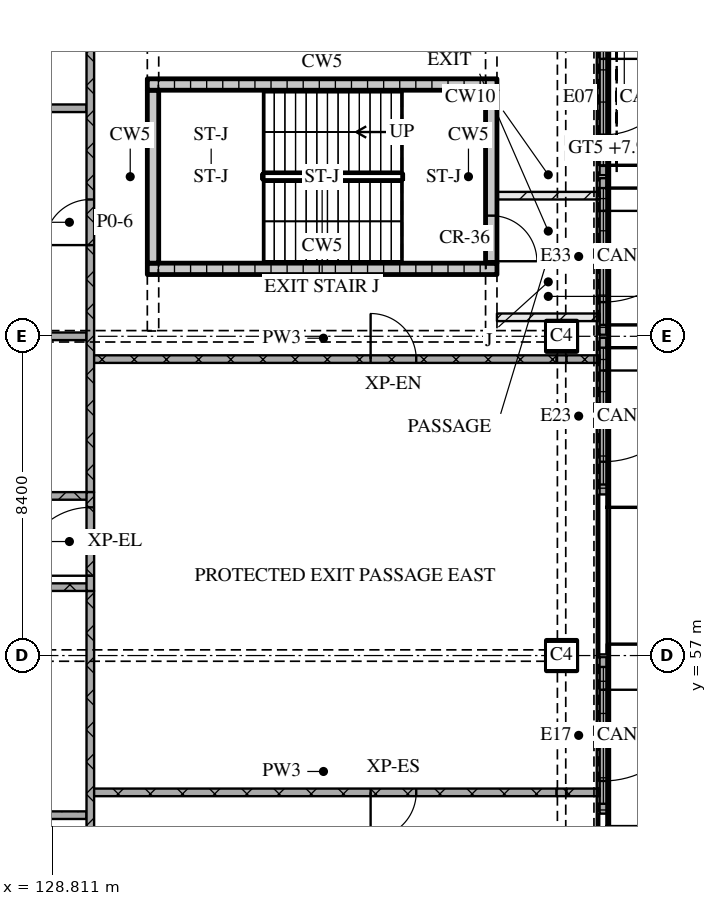
"""IFC4 building model, lengths in metres.
Left out: names, types, materials, properties, quantities, classifications, styles, units other than length and angle.
Written with IfcOpenShell. Run it as: python <this file> out.ifc"""

import sys

from ifc_helpers import new_model, si_unit, direction, frame, frame_2d, origin, origin_2d, place, context, subcontext, project, spatial, rectangle, extrude, element, fill, save


model = new_model("IFC4")
c1 = context("Model", 3, precision=1e-05, world=origin(), true_north=direction((0.0, 1.0)))
c2 = subcontext(c1, "Body", "Model", "MODEL_VIEW")
j1 = project(units=[si_unit("LENGTHUNIT", "METRE"), si_unit("PLANEANGLEUNIT", "RADIAN")], contexts=[c1])
p1 = place(None, origin())
s1 = spatial("IfcSite", under=j1, at=p1, CompositionType="ELEMENT")
p2 = place(p1, origin())
s2 = spatial("IfcBuilding", under=s1, at=p2, CompositionType="ELEMENT")
p3 = place(p2, origin())
s3 = spatial("IfcBuildingStorey", under=s2, at=p3, CompositionType="ELEMENT", Elevation=0.0)
for number, where, z_axis, x_axis in (
    (1, (142.2, 57.0, 0.0), (0.0, 0.0, 1.0), (1.0, 0.0, 0.0)),
    (2, (142.2, 65.4, 0.0), (0.0, 0.0, 1.0), (1.0, 0.0, 0.0)),
):
    element("IfcColumn", number, at=place(p3, frame(where, z_axis=z_axis, x_axis=x_axis)), inside=s3, PredefinedType="COLUMN", context=c2, shape_type="SweptSolid", body=[
        extrude(rectangle(XDim=0.8, YDim=0.8, at=origin_2d()), origin(), (0.0, 0.0, 1.0), 9.0),
    ])
p4 = place(p3, frame((143.3, 73.76, 0.0), z_axis=(0.0, 0.0, 1.0), x_axis=(0.0, -1.0, 0.0)))
e3 = element("IfcWall", 3, at=p4, inside=s3, PredefinedType="SOLIDWALL", context=c2, shape_type="SweptSolid", body=[
    extrude(rectangle(XDim=4.12, YDim=0.2, at=frame_2d((2.06, 0.0))), origin(), (0.0, 0.0, 1.0), 8.7),
])
p5 = place(p4, frame((1.06, 0.0, 0.0)))
e4 = element("IfcOpeningElement", 4, at=p5, cuts=e3, PredefinedType="OPENING", context=c2, shape_type="SweptSolid", body=[
    extrude(rectangle(XDim=2.0, YDim=2.4, at=frame_2d((1.0, 1.2))), frame((0.0, 0.11, 0.0), z_axis=(0.0, -1.0, 0.0), x_axis=(1.0, 0.0, 0.0)), (0.0, 0.0, 1.0), 0.22),
])
p6 = place(p4, frame((0.26, 0.0, 2.7)))
e5 = element("IfcOpeningElement", 5, at=p6, cuts=e3, PredefinedType="OPENING", context=c2, shape_type="SweptSolid", body=[
    extrude(rectangle(XDim=3.6, YDim=5.6, at=frame_2d((1.8, 2.8))), frame((0.0, 0.11, 0.0), z_axis=(0.0, -1.0, 0.0), x_axis=(1.0, 0.0, 0.0)), (0.0, 0.0, 1.0), 0.22),
])
p7 = place(p3, frame((143.3, 56.96, 0.0), z_axis=(0.0, 0.0, 1.0), x_axis=(0.0, -1.0, 0.0)))
e6 = element("IfcWall", 6, at=p7, inside=s3, PredefinedType="SOLIDWALL", context=c2, shape_type="SweptSolid", body=[
    extrude(rectangle(XDim=4.12, YDim=0.2, at=frame_2d((2.06, 0.0))), origin(), (0.0, 0.0, 1.0), 8.7),
])
p8 = place(p7, frame((0.86, 0.0, 0.0)))
e7 = element("IfcOpeningElement", 7, at=p8, cuts=e6, PredefinedType="OPENING", context=c2, shape_type="SweptSolid", body=[
    extrude(rectangle(XDim=2.4, YDim=2.4, at=frame_2d((1.2, 1.2))), frame((0.0, 0.11, 0.0), z_axis=(0.0, -1.0, 0.0), x_axis=(1.0, 0.0, 0.0)), (0.0, 0.0, 1.0), 0.22),
])
p9 = place(p7, frame((0.26, 0.0, 2.7)))
e8 = element("IfcOpeningElement", 8, at=p9, cuts=e6, PredefinedType="OPENING", context=c2, shape_type="SweptSolid", body=[
    extrude(rectangle(XDim=3.6, YDim=5.6, at=frame_2d((1.8, 2.8))), frame((0.0, 0.11, 0.0), z_axis=(0.0, -1.0, 0.0), x_axis=(1.0, 0.0, 0.0)), (0.0, 0.0, 1.0), 0.22),
])
p10 = place(p3, frame((143.3, 65.36, 0.0), z_axis=(0.0, 0.0, 1.0), x_axis=(0.0, -1.0, 0.0)))
e9 = element("IfcWall", 9, at=p10, inside=s3, PredefinedType="SOLIDWALL", context=c2, shape_type="SweptSolid", body=[
    extrude(rectangle(XDim=4.12, YDim=0.2, at=frame_2d((2.06, 0.0))), origin(), (0.0, 0.0, 1.0), 8.7),
])
p11 = place(p10, frame((0.86, 0.0, 0.0)))
e10 = element("IfcOpeningElement", 10, at=p11, cuts=e9, PredefinedType="OPENING", context=c2, shape_type="SweptSolid", body=[
    extrude(rectangle(XDim=2.4, YDim=2.4, at=frame_2d((1.2, 1.2))), frame((0.0, 0.11, 0.0), z_axis=(0.0, -1.0, 0.0), x_axis=(1.0, 0.0, 0.0)), (0.0, 0.0, 1.0), 0.22),
])
p12 = place(p10, frame((0.26, 0.0, 2.7)))
e11 = element("IfcOpeningElement", 11, at=p12, cuts=e9, PredefinedType="OPENING", context=c2, shape_type="SweptSolid", body=[
    extrude(rectangle(XDim=3.6, YDim=5.6, at=frame_2d((1.8, 2.8))), frame((0.0, 0.11, 0.0), z_axis=(0.0, -1.0, 0.0), x_axis=(1.0, 0.0, 0.0)), (0.0, 0.0, 1.0), 0.22),
])
p13 = place(p3, frame((143.3, 69.56, 0.0), z_axis=(0.0, 0.0, 1.0), x_axis=(0.0, -1.0, 0.0)))
e12 = element("IfcWall", 12, at=p13, inside=s3, PredefinedType="SOLIDWALL", context=c2, shape_type="SweptSolid", body=[
    extrude(rectangle(XDim=4.12, YDim=0.2, at=frame_2d((2.06, 0.0))), origin(), (0.0, 0.0, 1.0), 8.7),
])
p14 = place(p13, frame((0.86, 0.0, 0.0)))
e13 = element("IfcOpeningElement", 13, at=p14, cuts=e12, PredefinedType="OPENING", context=c2, shape_type="SweptSolid", body=[
    extrude(rectangle(XDim=2.4, YDim=2.4, at=frame_2d((1.2, 1.2))), frame((0.0, 0.11, 0.0), z_axis=(0.0, -1.0, 0.0), x_axis=(1.0, 0.0, 0.0)), (0.0, 0.0, 1.0), 0.22),
])
p15 = place(p13, frame((0.26, 0.0, 2.7)))
e14 = element("IfcOpeningElement", 14, at=p15, cuts=e12, PredefinedType="OPENING", context=c2, shape_type="SweptSolid", body=[
    extrude(rectangle(XDim=3.6, YDim=5.6, at=frame_2d((1.8, 2.8))), frame((0.0, 0.11, 0.0), z_axis=(0.0, -1.0, 0.0), x_axis=(1.0, 0.0, 0.0)), (0.0, 0.0, 1.0), 0.22),
])
p16 = place(p3, frame((131.3, 67.175, 0.0), z_axis=(0.0, 0.0, 1.0), x_axis=(1.0, 0.0, 0.0)))
e15 = element("IfcWall", 15, at=p16, inside=s3, PredefinedType="SOLIDWALL", context=c2, shape_type="SweptSolid", body=[
    extrude(rectangle(XDim=9.2, YDim=0.3, at=frame_2d((4.6, 0.0))), origin(), (0.0, 0.0, 1.0), 8.7),
])
p17 = place(p3, frame((131.45, 67.325, 0.0), z_axis=(0.0, 0.0, 1.0), x_axis=(0.0, 1.0, 0.0)))
e16 = element("IfcWall", 16, at=p17, inside=s3, PredefinedType="SOLIDWALL", context=c2, shape_type="SweptSolid", body=[
    extrude(rectangle(XDim=4.55, YDim=0.3, at=frame_2d((2.275, 0.0))), origin(), (0.0, 0.0, 1.0), 8.7),
])
p18 = place(p3, frame((140.35, 67.325, 0.0), z_axis=(0.0, 0.0, 1.0), x_axis=(0.0, 1.0, 0.0)))
e17 = element("IfcWall", 17, at=p18, inside=s3, PredefinedType="SOLIDWALL", context=c2, shape_type="SweptSolid", body=[
    extrude(rectangle(XDim=4.55, YDim=0.3, at=frame_2d((2.275, 0.0))), origin(), (0.0, 0.0, 1.0), 8.7),
])
p19 = place(p18, frame((0.05, 0.0, 0.0)))
e18 = element("IfcOpeningElement", 18, at=p19, cuts=e17, PredefinedType="OPENING", context=c2, shape_type="SweptSolid", body=[
    extrude(rectangle(XDim=1.2, YDim=2.1, at=frame_2d((0.6, 1.05))), frame((0.0, 0.16, 0.0), z_axis=(0.0, -1.0, 0.0), x_axis=(1.0, 0.0, 0.0)), (0.0, 0.0, 1.0), 0.32),
])
p20 = place(p3, frame((131.3, 72.025, 0.0), z_axis=(0.0, 0.0, 1.0), x_axis=(1.0, 0.0, 0.0)))
e19 = element("IfcWall", 19, at=p20, inside=s3, PredefinedType="SOLIDWALL", context=c2, shape_type="SweptSolid", body=[
    extrude(rectangle(XDim=9.2, YDim=0.3, at=frame_2d((4.6, 0.0))), origin(), (0.0, 0.0, 1.0), 8.7),
])
for number, where, z_axis, x_axis in (
    (20, (140.5, 65.9, 0.0), (0.0, 0.0, 1.0), (1.0, 0.0, 0.0)),
    (21, (140.5, 69.1, 0.0), (0.0, 0.0, 1.0), (1.0, 0.0, 0.0)),
):
    element("IfcWall", number, at=place(p3, frame(where, z_axis=z_axis, x_axis=x_axis)), inside=s3, PredefinedType="PARTITIONING", context=c2, shape_type="SweptSolid", body=[
        extrude(rectangle(XDim=2.7, YDim=0.2, at=frame_2d((1.35, 0.0))), origin(), (0.0, 0.0, 1.0), 8.7),
    ])
p21 = place(p3, frame((129.8, 53.4, 0.0), z_axis=(0.0, 0.0, 1.0), x_axis=(1.0, 0.0, 0.0)))
e22 = element("IfcWall", 22, at=p21, inside=s3, PredefinedType="PARTITIONING", context=c2, shape_type="SweptSolid", body=[
    extrude(rectangle(XDim=12.27, YDim=0.2, at=frame_2d((6.135, 0.0))), origin(), (0.0, 0.0, 1.0), 8.7),
])
p22 = place(p21, frame((7.375, 0.0, 0.0)))
e23 = element("IfcOpeningElement", 23, at=p22, cuts=e22, PredefinedType="OPENING", context=c2, shape_type="SweptSolid", body=[
    extrude(rectangle(XDim=1.2, YDim=2.1, at=frame_2d((0.6, 1.05))), frame((0.0, 0.11, 0.0), z_axis=(0.0, -1.0, 0.0), x_axis=(1.0, 0.0, 0.0)), (0.0, 0.0, 1.0), 0.22),
])
p23 = place(p3, frame((142.07, 53.4, 0.0), z_axis=(0.0, 0.0, 1.0), x_axis=(1.0, 0.0, 0.0)))
e24 = element("IfcWall", 24, at=p23, inside=s3, PredefinedType="PARTITIONING", context=c2, shape_type="SweptSolid", body=[
    extrude(rectangle(XDim=0.26, YDim=0.2, at=frame_2d((0.13, 0.0))), origin(), (0.0, 0.0, 1.0), 8.1),
])
p24 = place(p3, frame((142.33, 53.4, 0.0), z_axis=(0.0, 0.0, 1.0), x_axis=(1.0, 0.0, 0.0)))
e25 = element("IfcWall", 25, at=p24, inside=s3, PredefinedType="PARTITIONING", context=c2, shape_type="SweptSolid", body=[
    extrude(rectangle(XDim=0.87, YDim=0.2, at=frame_2d((0.435, 0.0))), origin(), (0.0, 0.0, 1.0), 8.7),
])
p25 = place(p3, frame((129.8, 64.8, 0.0), z_axis=(0.0, 0.0, 1.0), x_axis=(1.0, 0.0, 0.0)))
e26 = element("IfcWall", 26, at=p25, inside=s3, PredefinedType="PARTITIONING", context=c2, shape_type="SweptSolid", body=[
    extrude(rectangle(XDim=12.27, YDim=0.2, at=frame_2d((6.135, 0.0))), origin(), (0.0, 0.0, 1.0), 8.7),
])
p26 = place(p25, frame((7.375, 0.0, 0.0)))
e27 = element("IfcOpeningElement", 27, at=p26, cuts=e26, PredefinedType="OPENING", context=c2, shape_type="SweptSolid", body=[
    extrude(rectangle(XDim=1.2, YDim=2.1, at=frame_2d((0.6, 1.05))), frame((0.0, 0.11, 0.0), z_axis=(0.0, -1.0, 0.0), x_axis=(1.0, 0.0, 0.0)), (0.0, 0.0, 1.0), 0.22),
])
p27 = place(p3, frame((142.07, 64.8, 0.0), z_axis=(0.0, 0.0, 1.0), x_axis=(1.0, 0.0, 0.0)))
e28 = element("IfcWall", 28, at=p27, inside=s3, PredefinedType="PARTITIONING", context=c2, shape_type="SweptSolid", body=[
    extrude(rectangle(XDim=0.26, YDim=0.2, at=frame_2d((0.13, 0.0))), origin(), (0.0, 0.0, 1.0), 8.1),
])
p28 = place(p3, frame((142.33, 64.8, 0.0), z_axis=(0.0, 0.0, 1.0), x_axis=(1.0, 0.0, 0.0)))
e29 = element("IfcWall", 29, at=p28, inside=s3, PredefinedType="PARTITIONING", context=c2, shape_type="SweptSolid", body=[
    extrude(rectangle(XDim=0.87, YDim=0.2, at=frame_2d((0.435, 0.0))), origin(), (0.0, 0.0, 1.0), 8.7),
])
p29 = place(p3, frame((107.5, 52.8, 0.0), z_axis=(0.0, 0.0, 1.0), x_axis=(1.0, 0.0, 0.0)))
e30 = element("IfcWall", 30, at=p29, inside=s3, PredefinedType="PARTITIONING", context=c2, shape_type="SweptSolid", body=[
    extrude(rectangle(XDim=22.2, YDim=0.2, at=frame_2d((11.1, 0.0))), origin(), (0.0, 0.0, 1.0), 8.7),
])
p30 = place(p3, frame((129.8, 58.8, 0.0), z_axis=(0.0, 0.0, 1.0), x_axis=(-1.0, 0.0, 0.0)))
e31 = element("IfcWall", 31, at=p30, inside=s3, PredefinedType="PARTITIONING", context=c2, shape_type="SweptSolid", body=[
    extrude(rectangle(XDim=22.4, YDim=0.2, at=frame_2d((11.2, 0.0))), origin(), (0.0, 0.0, 1.0), 8.7),
])
p31 = place(p30, frame((10.6, 0.0, 0.0)))
e32 = element("IfcOpeningElement", 32, at=p31, cuts=e31, PredefinedType="OPENING", context=c2, shape_type="SweptSolid", body=[
    extrude(rectangle(XDim=1.2, YDim=2.1, at=frame_2d((0.6, 1.05))), frame((0.0, 0.11, 0.0), z_axis=(0.0, -1.0, 0.0), x_axis=(1.0, 0.0, 0.0)), (0.0, 0.0, 1.0), 0.22),
])
p32 = place(p3, frame((111.0, 61.2, 0.0), z_axis=(0.0, 0.0, 1.0), x_axis=(1.0, 0.0, 0.0)))
e33 = element("IfcWall", 33, at=p32, inside=s3, PredefinedType="PARTITIONING", context=c2, shape_type="SweptSolid", body=[
    extrude(rectangle(XDim=18.8, YDim=0.2, at=frame_2d((9.4, 0.0))), origin(), (0.0, 0.0, 1.0), 8.7),
])
p33 = place(p3, frame((126.52, 65.4, 0.0), z_axis=(0.0, 0.0, 1.0), x_axis=(1.0, 0.0, 0.0)))
e34 = element("IfcWall", 34, at=p33, inside=s3, PredefinedType="PARTITIONING", context=c2, shape_type="SweptSolid", body=[
    extrude(rectangle(XDim=3.18, YDim=0.2, at=frame_2d((1.59, 0.0))), origin(), (0.0, 0.0, 1.0), 7.71),
])
p34 = place(p3, frame((117.8, 71.4, 0.0), z_axis=(0.0, 0.0, 1.0), x_axis=(1.0, 0.0, 0.0)))
e35 = element("IfcWall", 35, at=p34, inside=s3, PredefinedType="PARTITIONING", context=c2, shape_type="SweptSolid", body=[
    extrude(rectangle(XDim=11.9, YDim=0.2, at=frame_2d((5.95, 0.0))), origin(), (0.0, 0.0, 1.0), 8.7),
])
p35 = place(p3, frame((129.8, 58.7, 0.0), z_axis=(0.0, 0.0, 1.0), x_axis=(0.0, -1.0, 0.0)))
e36 = element("IfcWall", 36, at=p35, inside=s3, PredefinedType="PARTITIONING", context=c2, shape_type="SweptSolid", body=[
    extrude(rectangle(XDim=24.4, YDim=0.2, at=frame_2d((12.2, 0.0))), origin(), (0.0, 0.0, 1.0), 8.7),
])
p36 = place(p3, frame((129.8, 61.3, 0.0), z_axis=(0.0, 0.0, 1.0), x_axis=(0.0, 1.0, 0.0)))
e37 = element("IfcWall", 37, at=p36, inside=s3, PredefinedType="PARTITIONING", context=c2, shape_type="SweptSolid", body=[
    extrude(rectangle(XDim=14.2, YDim=0.2, at=frame_2d((7.1, 0.0))), origin(), (0.0, 0.0, 1.0), 8.7),
])
p37 = place(p36, frame((6.5, 0.0, 0.0)))
e38 = element("IfcOpeningElement", 38, at=p37, cuts=e37, PredefinedType="OPENING", context=c2, shape_type="SweptSolid", body=[
    extrude(rectangle(XDim=1.2, YDim=2.1, at=frame_2d((0.6, 1.05))), frame((0.0, 0.11, 0.0), z_axis=(0.0, -1.0, 0.0), x_axis=(1.0, 0.0, 0.0)), (0.0, 0.0, 1.0), 0.22),
])
p38 = place(p36, frame((11.65, 0.0, 0.0)))
e39 = element("IfcOpeningElement", 39, at=p38, cuts=e37, PredefinedType="OPENING", context=c2, shape_type="SweptSolid", body=[
    extrude(rectangle(XDim=1.0, YDim=2.1, at=frame_2d((0.5, 1.05))), frame((0.0, 0.11, 0.0), z_axis=(0.0, -1.0, 0.0), x_axis=(1.0, 0.0, 0.0)), (0.0, 0.0, 1.0), 0.22),
])
p39 = place(p3, frame((129.8, 58.7, 0.0), z_axis=(0.0, 0.0, 1.0), x_axis=(0.0, 1.0, 0.0)))
e40 = element("IfcWall", 40, at=p39, inside=s3, PredefinedType="PARTITIONING", context=c2, shape_type="SweptSolid", body=[
    extrude(rectangle(XDim=2.6, YDim=0.2, at=frame_2d((1.3, 0.0))), origin(), (0.0, 0.0, 1.0), 8.7),
])
p40 = place(p39, frame((0.4, 0.0, 0.0)))
e41 = element("IfcOpeningElement", 41, at=p40, cuts=e40, PredefinedType="OPENING", context=c2, shape_type="SweptSolid", body=[
    extrude(rectangle(XDim=1.8, YDim=2.1, at=frame_2d((0.9, 1.05))), frame((0.0, 0.11, 0.0), z_axis=(0.0, -1.0, 0.0), x_axis=(1.0, 0.0, 0.0)), (0.0, 0.0, 1.0), 0.22),
])
p41 = place(p5, origin())
e42 = element("IfcDoor", 42, at=p41, inside=s3, OperationType="DOUBLE_DOOR_SINGLE_SWING", PredefinedType="GATE", context=c2, shape_type="SweptSolid", body=[
    extrude(rectangle(XDim=2.0, YDim=2.4, at=frame_2d((1.0, 1.2))), frame((0.0, 0.025, 0.0), z_axis=(0.0, -1.0, 0.0), x_axis=(1.0, 0.0, 0.0)), (0.0, 0.0, 1.0), 0.05),
])
fill(e4, e42)
p42 = place(p6, origin())
e43 = element("IfcWindow", 43, at=p42, inside=s3, PartitioningType="SINGLE_PANEL", PredefinedType="WINDOW", context=c2, shape_type="SweptSolid", body=[
    extrude(rectangle(XDim=3.6, YDim=5.6, at=frame_2d((1.8, 2.8))), frame((0.0, 0.03, 0.0), z_axis=(0.0, -1.0, 0.0), x_axis=(1.0, 0.0, 0.0)), (0.0, 0.0, 1.0), 0.06),
])
fill(e5, e43)
p43 = place(p8, origin())
e44 = element("IfcDoor", 44, at=p43, inside=s3, OperationType="DOUBLE_DOOR_SINGLE_SWING", PredefinedType="DOOR", context=c2, shape_type="SweptSolid", body=[
    extrude(rectangle(XDim=2.4, YDim=2.4, at=frame_2d((1.2, 1.2))), frame((0.0, 0.025, 0.0), z_axis=(0.0, -1.0, 0.0), x_axis=(1.0, 0.0, 0.0)), (0.0, 0.0, 1.0), 0.05),
])
fill(e7, e44)
p44 = place(p9, origin())
e45 = element("IfcWindow", 45, at=p44, inside=s3, PartitioningType="SINGLE_PANEL", PredefinedType="WINDOW", context=c2, shape_type="SweptSolid", body=[
    extrude(rectangle(XDim=3.6, YDim=5.6, at=frame_2d((1.8, 2.8))), frame((0.0, 0.03, 0.0), z_axis=(0.0, -1.0, 0.0), x_axis=(1.0, 0.0, 0.0)), (0.0, 0.0, 1.0), 0.06),
])
fill(e8, e45)
p45 = place(p11, origin())
e46 = element("IfcDoor", 46, at=p45, inside=s3, OperationType="DOUBLE_DOOR_SINGLE_SWING", PredefinedType="DOOR", context=c2, shape_type="SweptSolid", body=[
    extrude(rectangle(XDim=2.4, YDim=2.4, at=frame_2d((1.2, 1.2))), frame((0.0, 0.025, 0.0), z_axis=(0.0, -1.0, 0.0), x_axis=(1.0, 0.0, 0.0)), (0.0, 0.0, 1.0), 0.05),
])
fill(e10, e46)
p46 = place(p12, origin())
e47 = element("IfcWindow", 47, at=p46, inside=s3, PartitioningType="SINGLE_PANEL", PredefinedType="WINDOW", context=c2, shape_type="SweptSolid", body=[
    extrude(rectangle(XDim=3.6, YDim=5.6, at=frame_2d((1.8, 2.8))), frame((0.0, 0.03, 0.0), z_axis=(0.0, -1.0, 0.0), x_axis=(1.0, 0.0, 0.0)), (0.0, 0.0, 1.0), 0.06),
])
fill(e11, e47)
p47 = place(p14, origin())
e48 = element("IfcDoor", 48, at=p47, inside=s3, OperationType="DOUBLE_DOOR_SINGLE_SWING", PredefinedType="DOOR", context=c2, shape_type="SweptSolid", body=[
    extrude(rectangle(XDim=2.4, YDim=2.4, at=frame_2d((1.2, 1.2))), frame((0.0, 0.025, 0.0), z_axis=(0.0, -1.0, 0.0), x_axis=(1.0, 0.0, 0.0)), (0.0, 0.0, 1.0), 0.05),
])
fill(e13, e48)
p48 = place(p15, origin())
e49 = element("IfcWindow", 49, at=p48, inside=s3, PartitioningType="SINGLE_PANEL", PredefinedType="WINDOW", context=c2, shape_type="SweptSolid", body=[
    extrude(rectangle(XDim=3.6, YDim=5.6, at=frame_2d((1.8, 2.8))), frame((0.0, 0.03, 0.0), z_axis=(0.0, -1.0, 0.0), x_axis=(1.0, 0.0, 0.0)), (0.0, 0.0, 1.0), 0.06),
])
fill(e14, e49)
p49 = place(p19, origin())
e50 = element("IfcDoor", 50, at=p49, inside=s3, OperationType="SINGLE_SWING_RIGHT", PredefinedType="DOOR", context=c2, shape_type="SweptSolid", body=[
    extrude(rectangle(XDim=1.2, YDim=2.1, at=frame_2d((0.6, 1.05))), frame((0.0, 0.025, 0.0), z_axis=(0.0, -1.0, 0.0), x_axis=(1.0, 0.0, 0.0)), (0.0, 0.0, 1.0), 0.05),
])
fill(e18, e50)
p50 = place(p22, origin())
e51 = element("IfcDoor", 51, at=p50, inside=s3, OperationType="SINGLE_SWING_RIGHT", PredefinedType="DOOR", context=c2, shape_type="SweptSolid", body=[
    extrude(rectangle(XDim=1.2, YDim=2.1, at=frame_2d((0.6, 1.05))), frame((0.0, 0.025, 0.0), z_axis=(0.0, -1.0, 0.0), x_axis=(1.0, 0.0, 0.0)), (0.0, 0.0, 1.0), 0.05),
])
fill(e23, e51)
p51 = place(p26, origin())
e52 = element("IfcDoor", 52, at=p51, inside=s3, OperationType="SINGLE_SWING_LEFT", PredefinedType="DOOR", context=c2, shape_type="SweptSolid", body=[
    extrude(rectangle(XDim=1.2, YDim=2.1, at=frame_2d((0.6, 1.05))), frame((0.0, 0.025, 0.0), z_axis=(0.0, -1.0, 0.0), x_axis=(1.0, 0.0, 0.0)), (0.0, 0.0, 1.0), 0.05),
])
fill(e27, e52)
p52 = place(p37, origin())
e53 = element("IfcDoor", 53, at=p52, inside=s3, OperationType="SINGLE_SWING_LEFT", PredefinedType="DOOR", context=c2, shape_type="SweptSolid", body=[
    extrude(rectangle(XDim=1.2, YDim=2.1, at=frame_2d((0.6, 1.05))), frame((0.0, 0.025, 0.0), z_axis=(0.0, -1.0, 0.0), x_axis=(1.0, 0.0, 0.0)), (0.0, 0.0, 1.0), 0.05),
])
fill(e38, e53)
p53 = place(p40, origin())
e54 = element("IfcDoor", 54, at=p53, inside=s3, OperationType="DOUBLE_DOOR_SINGLE_SWING", PredefinedType="DOOR", context=c2, shape_type="SweptSolid", body=[
    extrude(rectangle(XDim=1.8, YDim=2.1, at=frame_2d((0.9, 1.05))), frame((0.0, 0.025, 0.0), z_axis=(0.0, -1.0, 0.0), x_axis=(1.0, 0.0, 0.0)), (0.0, 0.0, 1.0), 0.05),
])
fill(e41, e54)
save(model, sys.argv[1])
